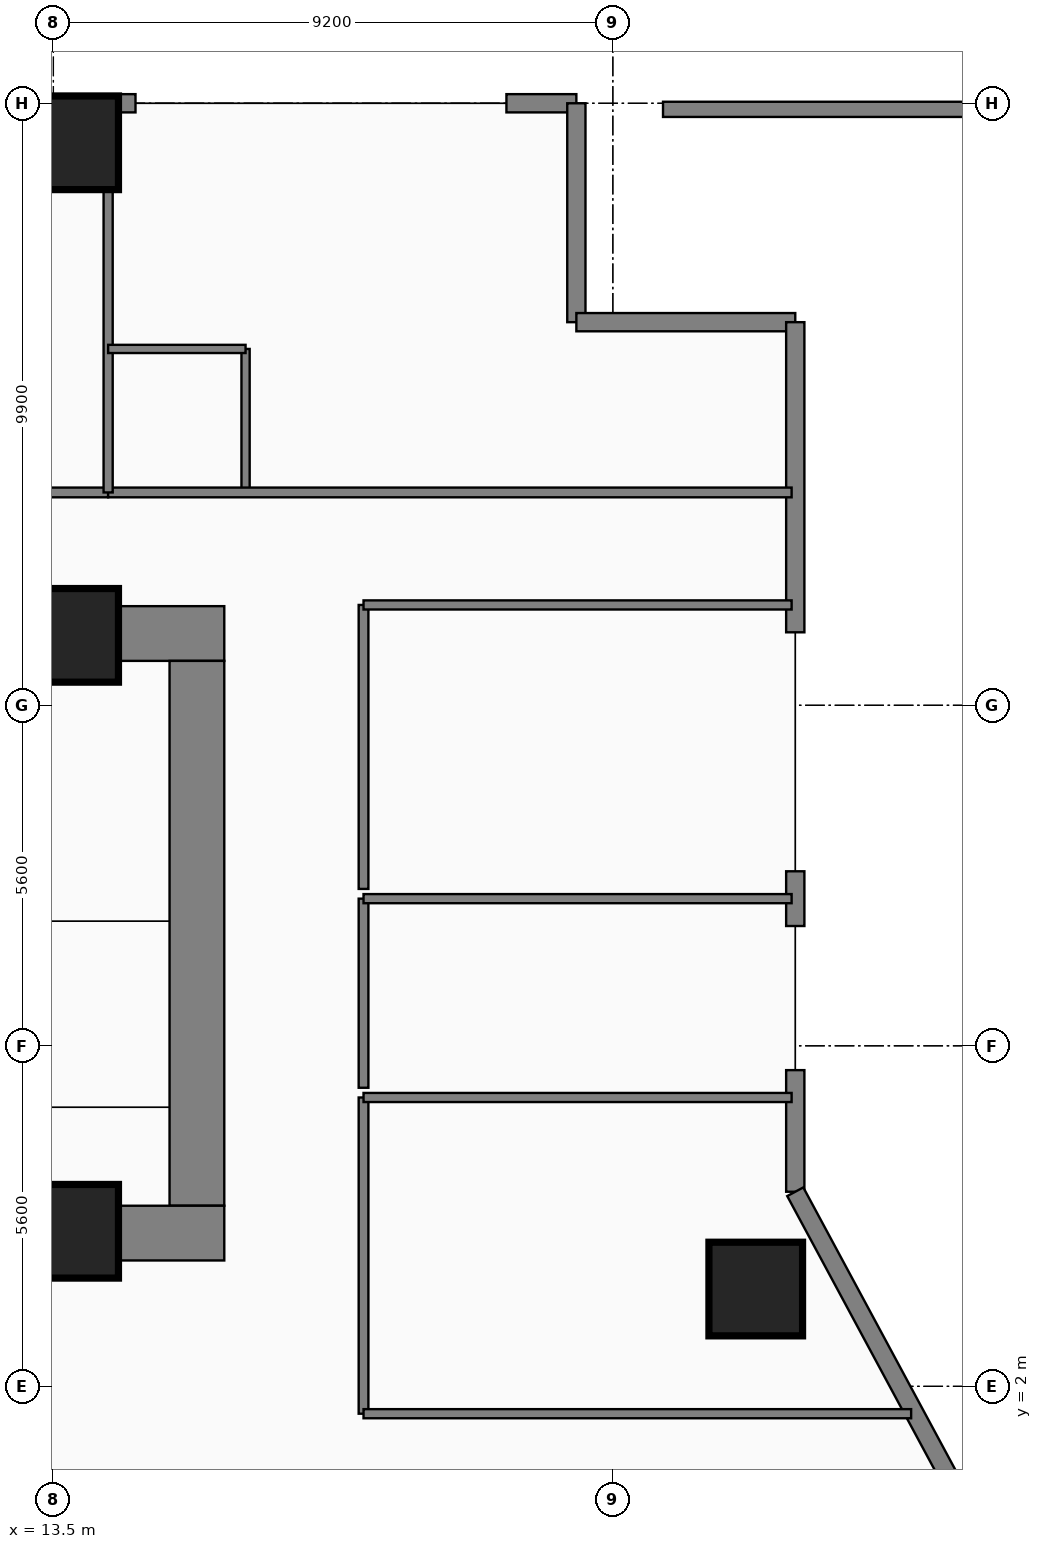
"""IFC4 building model, lengths in metres.
Left out: names, types, materials, properties, quantities, classifications, styles, units other than length and angle.
Written with IfcOpenShell. Run it as: python <this file> out.ifc"""

import sys

from ifc_helpers import new_model, si_unit, direction, frame, frame_2d, origin, origin_2d, place, context, subcontext, project, spatial, rectangle, extrude, element, fill, save


model = new_model("IFC4")
c1 = context("Model", 3, precision=1e-05, world=origin(), true_north=direction((0.0, 1.0)))
c2 = subcontext(c1, "Body", "Model", "MODEL_VIEW")
j1 = project(units=[si_unit("LENGTHUNIT", "METRE"), si_unit("PLANEANGLEUNIT", "RADIAN")], contexts=[c1])
p1 = place(None, origin())
s1 = spatial("IfcSite", under=j1, at=p1, CompositionType="ELEMENT")
p2 = place(p1, origin())
s2 = spatial("IfcBuilding", under=s1, at=p2, CompositionType="ELEMENT")
p3 = place(p2, frame((0.0, 0.0, 27.6)))
s3 = spatial("IfcBuildingStorey", under=s2, at=p3, CompositionType="ELEMENT", Elevation=27.6)
p4 = place(p3, frame((11.6, 14.38, 0.0), z_axis=(0.0, 0.0, 1.0), x_axis=(1.0, 0.0, 0.0)))
e1 = element("IfcWall", 1, at=p4, inside=s3, PredefinedType="SHEAR", context=c2, shape_type="SweptSolid", body=[
    extrude(rectangle(XDim=4.71, YDim=0.9, at=frame_2d((2.355, 0.0))), origin(), (0.0, 0.0, 1.0), 3.46),
])
p5 = place(p3, frame((15.86, 4.97, 0.0), z_axis=(0.0, 0.0, 1.0), x_axis=(0.0, 1.0, 0.0)))
e2 = element("IfcWall", 2, at=p5, inside=s3, PredefinedType="SHEAR", context=c2, shape_type="SweptSolid", body=[
    extrude(rectangle(XDim=8.96, YDim=0.9, at=frame_2d((4.48, 0.0))), origin(), (0.0, 0.0, 1.0), 3.46),
])
p6 = place(p3, frame((11.6, 4.52, 0.0), z_axis=(0.0, 0.0, 1.0), x_axis=(1.0, 0.0, 0.0)))
e3 = element("IfcWall", 3, at=p6, inside=s3, PredefinedType="SHEAR", context=c2, shape_type="SweptSolid", body=[
    extrude(rectangle(XDim=4.71, YDim=0.9, at=frame_2d((2.355, 0.0))), origin(), (0.0, 0.0, 1.0), 3.46),
])
for number, where, z_axis, x_axis in (
    (4, (13.8, 14.35, 0.0), (0.0, 0.0, 1.0), (1.0, 0.0, 0.0)),
    (5, (13.8, 4.55, 0.0), (0.0, 0.0, 1.0), (1.0, 0.0, 0.0)),
    (6, (13.8, 22.45, 0.0), (0.0, 0.0, 1.0), (1.0, 0.0, 0.0)),
    (7, (25.05, 3.6, 0.0), (0.0, 0.0, 1.0), (1.0, 0.0, 0.0)),
):
    element("IfcColumn", number, at=place(p3, frame(where, z_axis=z_axis, x_axis=x_axis)), inside=s3, PredefinedType="COLUMN", context=c2, shape_type="SweptSolid", body=[
        extrude(rectangle(XDim=1.5, YDim=1.5, at=origin_2d()), origin(), (0.0, 0.0, 1.0), 3.65),
    ])
p7 = place(p3, frame((23.525, 23.0, 0.0), z_axis=(0.0, 0.0, 1.0), x_axis=(1.0, 0.0, 0.0)))
e8 = element("IfcWall", 8, at=p7, inside=s3, PredefinedType="PARAPET", context=c2, shape_type="SweptSolid", body=[
    extrude(rectangle(XDim=8.295, YDim=0.25, at=frame_2d((4.147, 0.0))), origin(), (0.0, 0.0, 1.0), 1.15),
])
p8 = place(p3, frame((12.88, 23.1, 0.0), z_axis=(0.0, 0.0, 1.0), x_axis=(1.0, 0.0, 0.0)))
e9 = element("IfcWall", 9, at=p8, inside=s3, PredefinedType="STANDARD", context=c2, shape_type="SweptSolid", body=[
    extrude(rectangle(XDim=1.97, YDim=0.3, at=frame_2d((0.985, 0.0))), origin(), (0.0, 0.0, 1.0), 3.43),
])
p9 = place(p3, frame((20.95, 23.1, 0.0), z_axis=(0.0, 0.0, 1.0), x_axis=(1.0, 0.0, 0.0)))
e10 = element("IfcWall", 10, at=p9, inside=s3, PredefinedType="STANDARD", context=c2, shape_type="SweptSolid", body=[
    extrude(rectangle(XDim=1.15, YDim=0.3, at=frame_2d((0.575, 0.0))), origin(), (0.0, 0.0, 1.0), 3.43),
])
p10 = place(p3, frame((22.1, 23.1, 0.0), z_axis=(0.0, 0.0, 1.0), x_axis=(0.0, -1.0, 0.0)))
e11 = element("IfcWall", 11, at=p10, inside=s3, PredefinedType="STANDARD", context=c2, shape_type="SweptSolid", body=[
    extrude(rectangle(XDim=3.6, YDim=0.3, at=frame_2d((1.8, 0.0))), origin(), (0.0, 0.0, 1.0), 3.43),
])
p11 = place(p3, frame((22.1, 19.5, 0.0), z_axis=(0.0, 0.0, 1.0), x_axis=(1.0, 0.0, 0.0)))
e12 = element("IfcWall", 12, at=p11, inside=s3, PredefinedType="STANDARD", context=c2, shape_type="SweptSolid", body=[
    extrude(rectangle(XDim=3.6, YDim=0.3, at=frame_2d((1.8, 0.0))), origin(), (0.0, 0.0, 1.0), 3.43),
])
p12 = place(p3, frame((25.7, 19.5, 0.0), z_axis=(0.0, 0.0, 1.0), x_axis=(0.0, -1.0, 0.0)))
e13 = element("IfcWall", 13, at=p12, inside=s3, PredefinedType="STANDARD", context=c2, shape_type="SweptSolid", body=[
    extrude(rectangle(XDim=5.1, YDim=0.3, at=frame_2d((2.55, 0.0))), origin(), (0.0, 0.0, 1.0), 3.43),
])
p13 = place(p12, frame((0.66, 0.0, 0.85)))
e14 = element("IfcOpeningElement", 14, at=p13, cuts=e13, PredefinedType="OPENING", context=c2, shape_type="SweptSolid", body=[
    extrude(rectangle(XDim=1.6, YDim=1.8, at=frame_2d((0.8, 0.9))), frame((0.0, 0.16, 0.0), z_axis=(0.0, -1.0, 0.0), x_axis=(1.0, 0.0, 0.0)), (0.0, 0.0, 1.0), 0.32),
])
p14 = place(p12, frame((3.15, 0.0, 0.95)))
e15 = element("IfcOpeningElement", 15, at=p14, cuts=e13, PredefinedType="OPENING", context=c2, shape_type="SweptSolid", body=[
    extrude(rectangle(XDim=1.15, YDim=1.55, at=frame_2d((0.575, 0.775))), frame((0.0, 0.16, 0.0), z_axis=(0.0, -1.0, 0.0), x_axis=(1.0, 0.0, 0.0)), (0.0, 0.0, 1.0), 0.32),
])
p15 = place(p3, frame((25.7, 10.47, 0.0), z_axis=(0.0, 0.0, 1.0), x_axis=(0.0, -1.0, 0.0)))
e16 = element("IfcWall", 16, at=p15, inside=s3, PredefinedType="STANDARD", context=c2, shape_type="SweptSolid", body=[
    extrude(rectangle(XDim=0.9, YDim=0.3, at=frame_2d((0.45, 0.0))), origin(), (0.0, 0.0, 1.0), 3.43),
])
p16 = place(p3, frame((25.7, 7.2, 0.0), z_axis=(0.0, 0.0, 1.0), x_axis=(0.0, -1.0, 0.0)))
e17 = element("IfcWall", 17, at=p16, inside=s3, PredefinedType="STANDARD", context=c2, shape_type="SweptSolid", body=[
    extrude(rectangle(XDim=2.0, YDim=0.3, at=frame_2d((1.0, 0.0))), origin(), (0.0, 0.0, 1.0), 3.43),
])
p17 = place(p3, frame((25.7, 5.2, 0.0), z_axis=(0.0, 0.0, 1.0), x_axis=(0.474109683532, -0.880465790352, 0.0)))
e18 = element("IfcWall", 18, at=p17, inside=s3, PredefinedType="STANDARD", context=c2, shape_type="SweptSolid", body=[
    extrude(rectangle(XDim=5.906, YDim=0.3, at=frame_2d((2.953, 0.0))), origin(), (0.0, 0.0, 1.0), 3.43),
])
p18 = place(p17, frame((2.324, 0.0, 0.95)))
e19 = element("IfcOpeningElement", 19, at=p18, cuts=e18, PredefinedType="OPENING", context=c2, shape_type="SweptSolid", body=[
    extrude(rectangle(XDim=1.15, YDim=1.55, at=frame_2d((0.575, 0.775))), frame((0.0, 0.16, 0.0), z_axis=(0.0, -1.0, 0.0), x_axis=(1.0, 0.0, 0.0)), (0.0, 0.0, 1.0), 0.32),
])
p19 = place(p3, frame((9.8, 16.7, 0.0), z_axis=(0.0, 0.0, 1.0), x_axis=(1.0, 0.0, 0.0)))
e20 = element("IfcWall", 20, at=p19, inside=s3, PredefinedType="PARTITIONING", context=c2, shape_type="SweptSolid", body=[
    extrude(rectangle(XDim=4.6, YDim=0.16, at=frame_2d((2.3, 0.0))), origin(), (0.0, 0.0, 1.0), 2.973),
])
p20 = place(p19, frame((2.975, 0.0, 0.0)))
e21 = element("IfcOpeningElement", 21, at=p20, cuts=e20, PredefinedType="OPENING", context=c2, shape_type="SweptSolid", body=[
    extrude(rectangle(XDim=0.95, YDim=2.15, at=frame_2d((0.475, 1.075))), frame((0.0, 0.09, 0.0), z_axis=(0.0, -1.0, 0.0), x_axis=(1.0, 0.0, 0.0)), (0.0, 0.0, 1.0), 0.18),
])
p21 = place(p3, frame((16.66, 16.7, 0.0), z_axis=(0.0, 0.0, 1.0), x_axis=(0.0, 1.0, 0.0)))
e22 = element("IfcWall", 22, at=p21, inside=s3, PredefinedType="PLUMBINGWALL", context=c2, shape_type="SweptSolid", body=[
    extrude(rectangle(XDim=2.36, YDim=0.135, at=frame_2d((1.18, 0.0))), origin(), (0.0, 0.0, 1.0), 3.43),
])
p22 = place(p21, frame((0.65, 0.0, 0.0)))
e23 = element("IfcOpeningElement", 23, at=p22, cuts=e22, PredefinedType="OPENING", context=c2, shape_type="SweptSolid", body=[
    extrude(rectangle(XDim=0.85, YDim=2.1, at=frame_2d((0.425, 1.05))), frame((0.0, 0.077, 0.0), z_axis=(0.0, -1.0, 0.0), x_axis=(1.0, 0.0, 0.0)), (0.0, 0.0, 1.0), 0.155),
])
p23 = place(p3, frame((14.4, 16.7, 0.0), z_axis=(0.0, 0.0, 1.0), x_axis=(1.0, 0.0, 0.0)))
e24 = element("IfcWall", 24, at=p23, inside=s3, PredefinedType="PARTITIONING", context=c2, shape_type="SweptSolid", body=[
    extrude(rectangle(XDim=11.24, YDim=0.16, at=frame_2d((5.62, 0.0))), origin(), (0.0, 0.0, 1.0), 3.43),
])
p24 = place(p23, frame((6.27, 0.0, 0.0)))
e25 = element("IfcOpeningElement", 25, at=p24, cuts=e24, PredefinedType="OPENING", context=c2, shape_type="SweptSolid", body=[
    extrude(rectangle(XDim=1.0, YDim=2.15, at=frame_2d((0.5, 1.075))), frame((0.0, 0.09, 0.0), z_axis=(0.0, -1.0, 0.0), x_axis=(1.0, 0.0, 0.0)), (0.0, 0.0, 1.0), 0.18),
])
p25 = place(p3, frame((18.6, 1.55, 0.0), z_axis=(0.0, 0.0, 1.0), x_axis=(0.0, 1.0, 0.0)))
e26 = element("IfcWall", 26, at=p25, inside=s3, PredefinedType="PARTITIONING", context=c2, shape_type="SweptSolid", body=[
    extrude(rectangle(XDim=5.2, YDim=0.16, at=frame_2d((2.6, 0.0))), origin(), (0.0, 0.0, 1.0), 3.43),
])
p26 = place(p25, frame((2.14, 0.0, 0.0)))
e27 = element("IfcOpeningElement", 27, at=p26, cuts=e26, PredefinedType="OPENING", context=c2, shape_type="SweptSolid", body=[
    extrude(rectangle(XDim=0.92, YDim=2.12, at=frame_2d((0.46, 1.06))), frame((0.0, 0.09, 0.0), z_axis=(0.0, -1.0, 0.0), x_axis=(1.0, 0.0, 0.0)), (0.0, 0.0, 1.0), 0.18),
])
p27 = place(p3, frame((18.6, 6.91, 0.0), z_axis=(0.0, 0.0, 1.0), x_axis=(0.0, 1.0, 0.0)))
e28 = element("IfcWall", 28, at=p27, inside=s3, PredefinedType="PARTITIONING", context=c2, shape_type="SweptSolid", body=[
    extrude(rectangle(XDim=3.11, YDim=0.16, at=frame_2d((1.555, 0.0))), origin(), (0.0, 0.0, 1.0), 3.43),
])
p28 = place(p27, frame((1.095, 0.0, 0.0)))
e29 = element("IfcOpeningElement", 29, at=p28, cuts=e28, PredefinedType="OPENING", context=c2, shape_type="SweptSolid", body=[
    extrude(rectangle(XDim=0.92, YDim=2.12, at=frame_2d((0.46, 1.06))), frame((0.0, 0.09, 0.0), z_axis=(0.0, -1.0, 0.0), x_axis=(1.0, 0.0, 0.0)), (0.0, 0.0, 1.0), 0.18),
])
p29 = place(p3, frame((18.6, 10.18, 0.0), z_axis=(0.0, 0.0, 1.0), x_axis=(0.0, 1.0, 0.0)))
e30 = element("IfcWall", 30, at=p29, inside=s3, PredefinedType="PARTITIONING", context=c2, shape_type="SweptSolid", body=[
    extrude(rectangle(XDim=4.67, YDim=0.16, at=frame_2d((2.335, 0.0))), origin(), (0.0, 0.0, 1.0), 3.43),
])
p30 = place(p29, frame((1.875, 0.0, 0.0)))
e31 = element("IfcOpeningElement", 31, at=p30, cuts=e30, PredefinedType="OPENING", context=c2, shape_type="SweptSolid", body=[
    extrude(rectangle(XDim=0.92, YDim=2.12, at=frame_2d((0.46, 1.06))), frame((0.0, 0.09, 0.0), z_axis=(0.0, -1.0, 0.0), x_axis=(1.0, 0.0, 0.0)), (0.0, 0.0, 1.0), 0.18),
])
p31 = place(p3, frame((14.4, 16.7, 0.0), z_axis=(0.0, 0.0, 1.0), x_axis=(0.0, 1.0, 0.0)))
e32 = element("IfcWall", 32, at=p31, inside=s3, PredefinedType="PARTITIONING", context=c2, shape_type="SweptSolid", body=[
    extrude(rectangle(XDim=6.32, YDim=0.15, at=frame_2d((3.16, 0.0))), origin(), (0.0, 0.0, 1.0), 3.43),
])
p32 = place(p3, frame((14.4, 19.06, 0.0), z_axis=(0.0, 0.0, 1.0), x_axis=(1.0, 0.0, 0.0)))
e33 = element("IfcWall", 33, at=p32, inside=s3, PredefinedType="PLUMBINGWALL", context=c2, shape_type="SweptSolid", body=[
    extrude(rectangle(XDim=2.26, YDim=0.135, at=frame_2d((1.13, 0.0))), origin(), (0.0, 0.0, 1.0), 3.43),
])
p33 = place(p3, frame((18.6, 1.55, 0.0), z_axis=(0.0, 0.0, 1.0), x_axis=(1.0, 0.0, 0.0)))
e34 = element("IfcWall", 34, at=p33, inside=s3, PredefinedType="PARTITIONING", context=c2, shape_type="SweptSolid", body=[
    extrude(rectangle(XDim=9.005, YDim=0.15, at=frame_2d((4.503, 0.0))), origin(), (0.0, 0.0, 1.0), 3.43),
])
for number, where, z_axis, x_axis in (
    (35, (18.6, 6.75, 0.0), (0.0, 0.0, 1.0), (1.0, 0.0, 0.0)),
    (36, (18.6, 10.02, 0.0), (0.0, 0.0, 1.0), (1.0, 0.0, 0.0)),
    (37, (18.6, 14.85, 0.0), (0.0, 0.0, 1.0), (1.0, 0.0, 0.0)),
):
    element("IfcWall", number, at=place(p3, frame(where, z_axis=z_axis, x_axis=x_axis)), inside=s3, PredefinedType="PARTITIONING", context=c2, shape_type="SweptSolid", body=[
        extrude(rectangle(XDim=7.04, YDim=0.15, at=frame_2d((3.52, 0.0))), origin(), (0.0, 0.0, 1.0), 3.43),
    ])
p34 = place(p3, frame((0.0, 0.0, -0.22)))
p35 = place(p34, frame((29.05, 0.0, 0.0)))
p36 = place(p35, frame((0.0, 0.0, 0.17)))
e38 = element("IfcWindow", 38, at=p36, inside=s3, PartitioningType="SINGLE_PANEL", PredefinedType="SKYLIGHT", context=c2, shape_type="SweptSolid", body=[
    extrude(rectangle(XDim=1.8, YDim=1.8, at=origin_2d()), origin(), (0.0, 0.0, 1.0), 0.05),
])
p37 = place(p34, frame((29.05, 12.0, 0.0)))
p38 = place(p37, frame((0.0, 0.0, 0.17)))
e39 = element("IfcWindow", 39, at=p38, inside=s3, PartitioningType="SINGLE_PANEL", PredefinedType="SKYLIGHT", context=c2, shape_type="SweptSolid", body=[
    extrude(rectangle(XDim=1.8, YDim=1.8, at=origin_2d()), origin(), (0.0, 0.0, 1.0), 0.05),
])
p39 = place(p13, origin())
e40 = element("IfcWindow", 40, at=p39, inside=s3, PartitioningType="SINGLE_PANEL", PredefinedType="WINDOW", context=c2, shape_type="SweptSolid", body=[
    extrude(rectangle(XDim=1.6, YDim=1.8, at=frame_2d((0.8, 0.9))), frame((0.0, 0.03, 0.0), z_axis=(0.0, -1.0, 0.0), x_axis=(1.0, 0.0, 0.0)), (0.0, 0.0, 1.0), 0.06),
])
fill(e14, e40)
p40 = place(p14, origin())
e41 = element("IfcWindow", 41, at=p40, inside=s3, PartitioningType="SINGLE_PANEL", PredefinedType="WINDOW", context=c2, shape_type="SweptSolid", body=[
    extrude(rectangle(XDim=1.15, YDim=1.55, at=frame_2d((0.575, 0.775))), frame((0.0, 0.03, 0.0), z_axis=(0.0, -1.0, 0.0), x_axis=(1.0, 0.0, 0.0)), (0.0, 0.0, 1.0), 0.06),
])
fill(e15, e41)
p41 = place(p18, origin())
e42 = element("IfcWindow", 42, at=p41, inside=s3, PartitioningType="SINGLE_PANEL", PredefinedType="WINDOW", context=c2, shape_type="SweptSolid", body=[
    extrude(rectangle(XDim=1.15, YDim=1.55, at=frame_2d((0.575, 0.775))), frame((0.0, 0.03, 0.0), z_axis=(0.0, -1.0, 0.0), x_axis=(1.0, 0.0, 0.0)), (0.0, 0.0, 1.0), 0.06),
])
fill(e19, e42)
p42 = place(p20, origin())
e43 = element("IfcDoor", 43, at=p42, inside=s3, OperationType="SINGLE_SWING_RIGHT", PredefinedType="DOOR", context=c2, shape_type="SweptSolid", body=[
    extrude(rectangle(XDim=0.95, YDim=2.15, at=frame_2d((0.475, 1.075))), frame((0.0, 0.025, 0.0), z_axis=(0.0, -1.0, 0.0), x_axis=(1.0, 0.0, 0.0)), (0.0, 0.0, 1.0), 0.05),
])
fill(e21, e43)
p43 = place(p22, origin())
e44 = element("IfcDoor", 44, at=p43, inside=s3, OperationType="SINGLE_SWING_LEFT", PredefinedType="DOOR", context=c2, shape_type="SweptSolid", body=[
    extrude(rectangle(XDim=0.85, YDim=2.1, at=frame_2d((0.425, 1.05))), frame((0.0, 0.025, 0.0), z_axis=(0.0, -1.0, 0.0), x_axis=(1.0, 0.0, 0.0)), (0.0, 0.0, 1.0), 0.05),
])
fill(e23, e44)
p44 = place(p24, origin())
e45 = element("IfcDoor", 45, at=p44, inside=s3, OperationType="SINGLE_SWING_RIGHT", PredefinedType="DOOR", context=c2, shape_type="SweptSolid", body=[
    extrude(rectangle(XDim=1.0, YDim=2.15, at=frame_2d((0.5, 1.075))), frame((0.0, 0.025, 0.0), z_axis=(0.0, -1.0, 0.0), x_axis=(1.0, 0.0, 0.0)), (0.0, 0.0, 1.0), 0.05),
])
fill(e25, e45)
p45 = place(p26, origin())
e46 = element("IfcDoor", 46, at=p45, inside=s3, OperationType="SINGLE_SWING_LEFT", PredefinedType="DOOR", context=c2, shape_type="SweptSolid", body=[
    extrude(rectangle(XDim=0.92, YDim=2.12, at=frame_2d((0.46, 1.06))), frame((0.0, 0.025, 0.0), z_axis=(0.0, -1.0, 0.0), x_axis=(1.0, 0.0, 0.0)), (0.0, 0.0, 1.0), 0.05),
])
fill(e27, e46)
p46 = place(p28, origin())
e47 = element("IfcDoor", 47, at=p46, inside=s3, OperationType="SINGLE_SWING_RIGHT", PredefinedType="DOOR", context=c2, shape_type="SweptSolid", body=[
    extrude(rectangle(XDim=0.92, YDim=2.12, at=frame_2d((0.46, 1.06))), frame((0.0, 0.025, 0.0), z_axis=(0.0, -1.0, 0.0), x_axis=(1.0, 0.0, 0.0)), (0.0, 0.0, 1.0), 0.05),
])
fill(e29, e47)
p47 = place(p30, origin())
e48 = element("IfcDoor", 48, at=p47, inside=s3, OperationType="SINGLE_SWING_LEFT", PredefinedType="DOOR", context=c2, shape_type="SweptSolid", body=[
    extrude(rectangle(XDim=0.92, YDim=2.12, at=frame_2d((0.46, 1.06))), frame((0.0, 0.025, 0.0), z_axis=(0.0, -1.0, 0.0), x_axis=(1.0, 0.0, 0.0)), (0.0, 0.0, 1.0), 0.05),
])
fill(e31, e48)
save(model, sys.argv[1])
